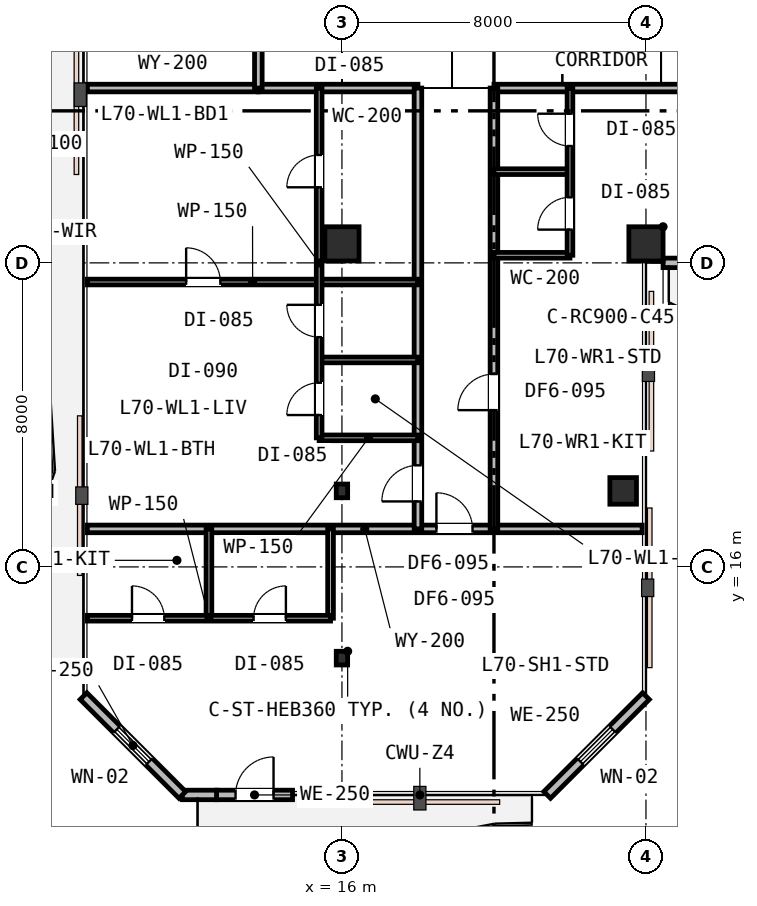
"""IFC4 building model, lengths in metres.
Left out: names, types, materials, properties, quantities, classifications, styles, units other than length and angle.
Written with IfcOpenShell. Run it as: python <this file> out.ifc"""

import sys

from ifc_helpers import new_model, si_unit, direction, frame, frame_2d, origin, origin_2d, place, context, subcontext, project, spatial, rectangle, i_section, extrude, element, fill, save


model = new_model("IFC4")
c1 = context("Model", 3, precision=1e-05, world=origin(), true_north=direction((0.0, 1.0)))
c2 = subcontext(c1, "Body", "Model", "MODEL_VIEW")
j1 = project(units=[si_unit("LENGTHUNIT", "METRE"), si_unit("PLANEANGLEUNIT", "RADIAN")], contexts=[c1])
p1 = place(None, origin())
s1 = spatial("IfcSite", under=j1, at=p1, CompositionType="ELEMENT")
p2 = place(p1, origin())
s2 = spatial("IfcBuilding", under=s1, at=p2, CompositionType="ELEMENT")
p3 = place(p2, frame((0.0, 0.0, 271.6)))
s3 = spatial("IfcBuildingStorey", under=s2, at=p3, CompositionType="ELEMENT", Elevation=271.6)
for number, where, z_axis, x_axis in (
    (1, (16.0, 24.5, 0.0), (0.0, 0.0, 1.0), (1.0, 0.0, 0.0)),
    (2, (24.0, 24.5, 0.0), (0.0, 0.0, 1.0), (1.0, 0.0, 0.0)),
):
    element("IfcColumn", number, at=place(p3, frame(where, z_axis=z_axis, x_axis=x_axis)), inside=s3, PredefinedType="COLUMN", context=c2, shape_type="SweptSolid", body=[
        extrude(rectangle(XDim=0.9, YDim=0.9, at=origin_2d()), origin(), (0.0, 0.0, 1.0), 3.8),
    ])
p4 = place(p3, frame((23.4, 18.0, 0.0), z_axis=(0.0, 0.0, 1.0), x_axis=(1.0, 0.0, 0.0)))
e3 = element("IfcColumn", 3, at=p4, inside=s3, PredefinedType="COLUMN", context=c2, shape_type="SweptSolid", body=[
    extrude(rectangle(XDim=0.7, YDim=0.7, at=origin_2d()), origin(), (0.0, 0.0, 1.0), 3.8),
])
for number, where, z_axis, x_axis in (
    (4, (16.0, 13.6, 0.0), (0.0, 0.0, 1.0), (1.0, 0.0, 0.0)),
    (5, (16.0, 18.0, 0.0), (0.0, 0.0, 1.0), (1.0, 0.0, 0.0)),
):
    element("IfcColumn", number, at=place(p3, frame(where, z_axis=z_axis, x_axis=x_axis)), inside=s3, PredefinedType="COLUMN", context=c2, shape_type="SweptSolid", body=[
        extrude(i_section(OverallWidth=0.3, OverallDepth=0.36, WebThickness=0.013, FlangeThickness=0.022, FilletRadius=0.027, at=origin_2d()), origin(), (0.0, 0.0, 1.0), 3.8),
    ])
p5 = place(p3, frame((12.7, 10.0, 0.0), z_axis=(0.0, 0.0, 1.0), x_axis=(1.0, 0.0, 0.0)))
e6 = element("IfcWall", 6, at=p5, inside=s3, PredefinedType="STANDARD", context=c2, shape_type="SweptSolid", body=[
    extrude(rectangle(XDim=2.0, YDim=0.25, at=frame_2d((1.0, 0.0))), origin(), (0.0, 0.0, 1.0), 3.53),
])
p6 = place(p5, frame((0.5, 0.0, 0.0)))
e7 = element("IfcOpeningElement", 7, at=p6, cuts=e6, PredefinedType="OPENING", context=c2, shape_type="SweptSolid", body=[
    extrude(rectangle(XDim=1.0, YDim=2.15, at=frame_2d((0.5, 1.075))), frame((0.0, 0.135, 0.0), z_axis=(0.0, -1.0, 0.0), x_axis=(1.0, 0.0, 0.0)), (0.0, 0.0, 1.0), 0.27),
])
p7 = place(p3, frame((11.8, 10.0, 0.0), z_axis=(0.0, 0.0, 1.0), x_axis=(1.0, 0.0, 0.0)))
e8 = element("IfcWall", 8, at=p7, inside=s3, PredefinedType="STANDARD", context=c2, shape_type="SweptSolid", body=[
    extrude(rectangle(XDim=0.9, YDim=0.25, at=frame_2d((0.45, 0.0))), origin(), (0.0, 0.0, 1.0), 3.53),
])
p8 = place(p3, frame((21.4, 10.0, 0.0), z_axis=(0.0, 0.0, 1.0), x_axis=(0.707106781187, 0.707106781187, 0.0)))
e9 = element("IfcWall", 9, at=p8, inside=s3, PredefinedType="STANDARD", context=c2, shape_type="SweptSolid", body=[
    extrude(rectangle(XDim=3.677, YDim=0.25, at=frame_2d((1.839, 0.0))), origin(), (0.0, 0.0, 1.0), 3.53),
])
p9 = place(p8, frame((1.238, 0.0, 0.85)))
e10 = element("IfcOpeningElement", 10, at=p9, cuts=e9, PredefinedType="OPENING", context=c2, shape_type="SweptSolid", body=[
    extrude(rectangle(XDim=1.2, YDim=1.6, at=frame_2d((0.6, 0.8))), frame((0.0, 0.135, 0.0), z_axis=(0.0, -1.0, 0.0), x_axis=(1.0, 0.0, 0.0)), (0.0, 0.0, 1.0), 0.27),
])
p10 = place(p3, frame((24.45, 24.0, 0.0), z_axis=(0.0, 0.0, 1.0), x_axis=(1.0, 0.0, 0.0)))
e11 = element("IfcWall", 11, at=p10, inside=s3, PredefinedType="STANDARD", context=c2, shape_type="SweptSolid", body=[
    extrude(rectangle(XDim=0.95, YDim=0.25, at=frame_2d((0.475, 0.0))), origin(), (0.0, 0.0, 1.0), 3.27),
])
p11 = place(p3, frame((9.2, 12.6, 0.0), z_axis=(0.0, 0.0, 1.0), x_axis=(0.707106781187, -0.707106781187, 0.0)))
e12 = element("IfcWall", 12, at=p11, inside=s3, PredefinedType="STANDARD", context=c2, shape_type="SweptSolid", body=[
    extrude(rectangle(XDim=3.677, YDim=0.25, at=frame_2d((1.839, 0.0))), origin(), (0.0, 0.0, 1.0), 3.53),
])
p12 = place(p11, frame((1.238, 0.0, 0.85)))
e13 = element("IfcOpeningElement", 13, at=p12, cuts=e12, PredefinedType="OPENING", context=c2, shape_type="SweptSolid", body=[
    extrude(rectangle(XDim=1.2, YDim=1.6, at=frame_2d((0.6, 0.8))), frame((0.0, 0.135, 0.0), z_axis=(0.0, -1.0, 0.0), x_axis=(1.0, 0.0, 0.0)), (0.0, 0.0, 1.0), 0.27),
])
p13 = place(p3, frame((9.3, 28.6, 0.0), z_axis=(0.0, 0.0, 1.0), x_axis=(1.0, 0.0, 0.0)))
e14 = element("IfcWall", 14, at=p13, inside=s3, PredefinedType="PARTITIONING", context=c2, shape_type="SweptSolid", body=[
    extrude(rectangle(XDim=4.5, YDim=0.2, at=frame_2d((2.25, 0.0))), origin(), (0.0, 0.0, 1.0), 3.53),
])
p14 = place(p3, frame((13.8, 28.6, 0.0), z_axis=(0.0, 0.0, 1.0), x_axis=(1.0, 0.0, 0.0)))
e15 = element("IfcWall", 15, at=p14, inside=s3, PredefinedType="PARTITIONING", context=c2, shape_type="SweptSolid", body=[
    extrude(rectangle(XDim=4.2, YDim=0.2, at=frame_2d((2.1, 0.0))), origin(), (0.0, 0.0, 1.0), 3.16),
])
p15 = place(p3, frame((20.0, 28.6, 0.0), z_axis=(0.0, 0.0, 1.0), x_axis=(1.0, 0.0, 0.0)))
e16 = element("IfcWall", 16, at=p15, inside=s3, PredefinedType="PARTITIONING", context=c2, shape_type="SweptSolid", body=[
    extrude(rectangle(XDim=25.9, YDim=0.2, at=frame_2d((12.95, 0.0))), origin(), (0.0, 0.0, 1.0), 3.16),
])
p16 = place(p15, frame((7.025, 0.0, 0.0)))
e17 = element("IfcOpeningElement", 17, at=p16, cuts=e16, PredefinedType="OPENING", context=c2, shape_type="SweptSolid", body=[
    extrude(rectangle(XDim=0.95, YDim=2.15, at=frame_2d((0.475, 1.075))), frame((0.0, 0.11, 0.0), z_axis=(0.0, -1.0, 0.0), x_axis=(1.0, 0.0, 0.0)), (0.0, 0.0, 1.0), 0.22),
])
p17 = place(p15, frame((13.625, 0.0, 0.0)))
e18 = element("IfcOpeningElement", 18, at=p17, cuts=e16, PredefinedType="OPENING", context=c2, shape_type="SweptSolid", body=[
    extrude(rectangle(XDim=0.95, YDim=2.15, at=frame_2d((0.475, 1.075))), frame((0.0, 0.11, 0.0), z_axis=(0.0, -1.0, 0.0), x_axis=(1.0, 0.0, 0.0)), (0.0, 0.0, 1.0), 0.22),
])
p18 = place(p15, frame((18.378, 0.0, 0.0)))
e19 = element("IfcOpeningElement", 19, at=p18, cuts=e16, PredefinedType="OPENING", context=c2, shape_type="SweptSolid", body=[
    extrude(rectangle(XDim=0.95, YDim=2.15, at=frame_2d((0.475, 1.075))), frame((0.0, 0.11, 0.0), z_axis=(0.0, -1.0, 0.0), x_axis=(1.0, 0.0, 0.0)), (0.0, 0.0, 1.0), 0.22),
])
p19 = place(p3, frame((13.8, 28.6, 0.0), z_axis=(0.0, 0.0, 1.0), x_axis=(0.0, 1.0, 0.0)))
e20 = element("IfcWall", 20, at=p19, inside=s3, PredefinedType="PARTITIONING", context=c2, shape_type="SweptSolid", body=[
    extrude(rectangle(XDim=7.4, YDim=0.2, at=frame_2d((3.7, 0.0))), origin(), (0.0, 0.0, 1.0), 3.53),
])
p20 = place(p19, frame((4.325, 0.0, 0.0)))
e21 = element("IfcOpeningElement", 21, at=p20, cuts=e20, PredefinedType="OPENING", context=c2, shape_type="SweptSolid", body=[
    extrude(rectangle(XDim=0.95, YDim=2.15, at=frame_2d((0.475, 1.075))), frame((0.0, 0.11, 0.0), z_axis=(0.0, -1.0, 0.0), x_axis=(1.0, 0.0, 0.0)), (0.0, 0.0, 1.0), 0.22),
])
p21 = place(p3, frame((9.3, 17.0, 0.0), z_axis=(0.0, 0.0, 1.0), x_axis=(1.0, 0.0, 0.0)))
e22 = element("IfcWall", 22, at=p21, inside=s3, PredefinedType="PARTITIONING", context=c2, shape_type="SweptSolid", body=[
    extrude(rectangle(XDim=14.6, YDim=0.2, at=frame_2d((7.3, 0.0))), origin(), (0.0, 0.0, 1.0), 3.16),
])
p22 = place(p21, frame((9.186, 0.0, 0.0)))
e23 = element("IfcOpeningElement", 23, at=p22, cuts=e22, PredefinedType="OPENING", context=c2, shape_type="SweptSolid", body=[
    extrude(rectangle(XDim=0.95, YDim=2.15, at=frame_2d((0.475, 1.075))), frame((0.0, 0.11, 0.0), z_axis=(0.0, -1.0, 0.0), x_axis=(1.0, 0.0, 0.0)), (0.0, 0.0, 1.0), 0.22),
])
p23 = place(p3, frame((18.0, 17.0, 0.0), z_axis=(0.0, 0.0, 1.0), x_axis=(0.0, 1.0, 0.0)))
e24 = element("IfcWall", 24, at=p23, inside=s3, PredefinedType="PARTITIONING", context=c2, shape_type="SweptSolid", body=[
    extrude(rectangle(XDim=11.6, YDim=0.2, at=frame_2d((5.8, 0.0))), origin(), (0.0, 0.0, 1.0), 3.16),
])
p24 = place(p23, frame((0.723, 0.0, 0.0)))
e25 = element("IfcOpeningElement", 25, at=p24, cuts=e24, PredefinedType="OPENING", context=c2, shape_type="SweptSolid", body=[
    extrude(rectangle(XDim=0.95, YDim=2.15, at=frame_2d((0.475, 1.075))), frame((0.0, 0.11, 0.0), z_axis=(0.0, -1.0, 0.0), x_axis=(1.0, 0.0, 0.0)), (0.0, 0.0, 1.0), 0.22),
])
for number, where, z_axis, x_axis in (
    (26, (15.4, 19.396, 0.0), (0.0, 0.0, 1.0), (1.0, 0.0, 0.0)),
    (27, (15.4, 21.446, 0.0), (0.0, 0.0, 1.0), (1.0, 0.0, 0.0)),
):
    element("IfcWall", number, at=place(p3, frame(where, z_axis=z_axis, x_axis=x_axis)), inside=s3, PredefinedType="PARTITIONING", context=c2, shape_type="SweptSolid", body=[
        extrude(rectangle(XDim=2.6, YDim=0.15, at=frame_2d((1.3, 0.0))), origin(), (0.0, 0.0, 1.0), 3.16),
    ])
p25 = place(p3, frame((9.3, 23.496, 0.0), z_axis=(0.0, 0.0, 1.0), x_axis=(1.0, 0.0, 0.0)))
e28 = element("IfcWall", 28, at=p25, inside=s3, PredefinedType="PARTITIONING", context=c2, shape_type="SweptSolid", body=[
    extrude(rectangle(XDim=8.7, YDim=0.15, at=frame_2d((4.35, 0.0))), origin(), (0.0, 0.0, 1.0), 3.16),
])
p26 = place(p25, frame((2.6, 0.0, 0.0)))
e29 = element("IfcOpeningElement", 29, at=p26, cuts=e28, PredefinedType="OPENING", context=c2, shape_type="SweptSolid", body=[
    extrude(rectangle(XDim=0.9, YDim=2.15, at=frame_2d((0.45, 1.075))), frame((0.0, 0.085, 0.0), z_axis=(0.0, -1.0, 0.0), x_axis=(1.0, 0.0, 0.0)), (0.0, 0.0, 1.0), 0.17),
])
p27 = place(p3, frame((15.4, 19.396, 0.0), z_axis=(0.0, 0.0, 1.0), x_axis=(0.0, 1.0, 0.0)))
e30 = element("IfcWall", 30, at=p27, inside=s3, PredefinedType="PARTITIONING", context=c2, shape_type="SweptSolid", body=[
    extrude(rectangle(XDim=9.204, YDim=0.15, at=frame_2d((4.602, 0.0))), origin(), (0.0, 0.0, 1.0), 3.53),
])
p28 = place(p27, frame((0.6, 0.0, 0.0)))
e31 = element("IfcOpeningElement", 31, at=p28, cuts=e30, PredefinedType="OPENING", context=c2, shape_type="SweptSolid", body=[
    extrude(rectangle(XDim=0.85, YDim=2.15, at=frame_2d((0.425, 1.075))), frame((0.0, 0.085, 0.0), z_axis=(0.0, -1.0, 0.0), x_axis=(1.0, 0.0, 0.0)), (0.0, 0.0, 1.0), 0.17),
])
p29 = place(p27, frame((2.65, 0.0, 0.0)))
e32 = element("IfcOpeningElement", 32, at=p29, cuts=e30, PredefinedType="OPENING", context=c2, shape_type="SweptSolid", body=[
    extrude(rectangle(XDim=0.85, YDim=2.15, at=frame_2d((0.425, 1.075))), frame((0.0, 0.085, 0.0), z_axis=(0.0, -1.0, 0.0), x_axis=(1.0, 0.0, 0.0)), (0.0, 0.0, 1.0), 0.17),
])
p30 = place(p27, frame((6.593, 0.0, 0.0)))
e33 = element("IfcOpeningElement", 33, at=p30, cuts=e30, PredefinedType="OPENING", context=c2, shape_type="SweptSolid", body=[
    extrude(rectangle(XDim=0.85, YDim=2.15, at=frame_2d((0.425, 1.075))), frame((0.0, 0.085, 0.0), z_axis=(0.0, -1.0, 0.0), x_axis=(1.0, 0.0, 0.0)), (0.0, 0.0, 1.0), 0.17),
])
p31 = place(p3, frame((20.0, 17.0, 0.0), z_axis=(0.0, 0.0, 1.0), x_axis=(0.0, 1.0, 0.0)))
e34 = element("IfcWall", 34, at=p31, inside=s3, PredefinedType="PARTITIONING", context=c2, shape_type="SweptSolid", body=[
    extrude(rectangle(XDim=11.6, YDim=0.2, at=frame_2d((5.8, 0.0))), origin(), (0.0, 0.0, 1.0), 3.16),
])
p32 = place(p31, frame((3.125, 0.0, 0.0)))
e35 = element("IfcOpeningElement", 35, at=p32, cuts=e34, PredefinedType="OPENING", context=c2, shape_type="SweptSolid", body=[
    extrude(rectangle(XDim=0.95, YDim=2.15, at=frame_2d((0.475, 1.075))), frame((0.0, 0.11, 0.0), z_axis=(0.0, -1.0, 0.0), x_axis=(1.0, 0.0, 0.0)), (0.0, 0.0, 1.0), 0.22),
])
p33 = place(p3, frame((20.0, 24.2, 0.0), z_axis=(0.0, 0.0, 1.0), x_axis=(1.0, 0.0, 0.0)))
e36 = element("IfcWall", 36, at=p33, inside=s3, PredefinedType="PARTITIONING", context=c2, shape_type="SweptSolid", body=[
    extrude(rectangle(XDim=2.0, YDim=0.15, at=frame_2d((1.0, 0.0))), origin(), (0.0, 0.0, 1.0), 3.16),
])
p34 = place(p3, frame((20.0, 26.4, 0.0), z_axis=(0.0, 0.0, 1.0), x_axis=(1.0, 0.0, 0.0)))
e37 = element("IfcWall", 37, at=p34, inside=s3, PredefinedType="PARTITIONING", context=c2, shape_type="SweptSolid", body=[
    extrude(rectangle(XDim=2.0, YDim=0.15, at=frame_2d((1.0, 0.0))), origin(), (0.0, 0.0, 1.0), 3.28),
])
p35 = place(p3, frame((22.0, 24.2, 0.0), z_axis=(0.0, 0.0, 1.0), x_axis=(0.0, 1.0, 0.0)))
e38 = element("IfcWall", 38, at=p35, inside=s3, PredefinedType="PARTITIONING", context=c2, shape_type="SweptSolid", body=[
    extrude(rectangle(XDim=4.4, YDim=0.15, at=frame_2d((2.2, 0.0))), origin(), (0.0, 0.0, 1.0), 3.16),
])
p36 = place(p35, frame((0.675, 0.0, 0.0)))
e39 = element("IfcOpeningElement", 39, at=p36, cuts=e38, PredefinedType="OPENING", context=c2, shape_type="SweptSolid", body=[
    extrude(rectangle(XDim=0.85, YDim=2.15, at=frame_2d((0.425, 1.075))), frame((0.0, 0.085, 0.0), z_axis=(0.0, -1.0, 0.0), x_axis=(1.0, 0.0, 0.0)), (0.0, 0.0, 1.0), 0.17),
])
p37 = place(p35, frame((2.875, 0.0, 0.0)))
e40 = element("IfcOpeningElement", 40, at=p37, cuts=e38, PredefinedType="OPENING", context=c2, shape_type="SweptSolid", body=[
    extrude(rectangle(XDim=0.85, YDim=2.15, at=frame_2d((0.425, 1.075))), frame((0.0, 0.085, 0.0), z_axis=(0.0, -1.0, 0.0), x_axis=(1.0, 0.0, 0.0)), (0.0, 0.0, 1.0), 0.17),
])
p38 = place(p3, frame((15.7, 14.65, 0.0), z_axis=(0.0, 0.0, 1.0), x_axis=(0.0, 1.0, 0.0)))
e41 = element("IfcWall", 41, at=p38, inside=s3, PredefinedType="PARTITIONING", context=c2, shape_type="SweptSolid", body=[
    extrude(rectangle(XDim=2.35, YDim=0.15, at=frame_2d((1.175, 0.0))), origin(), (0.0, 0.0, 1.0), 3.16),
])
p39 = place(p3, frame((12.5, 14.65, 0.0), z_axis=(0.0, 0.0, 1.0), x_axis=(0.0, 1.0, 0.0)))
e42 = element("IfcWall", 42, at=p39, inside=s3, PredefinedType="PARTITIONING", context=c2, shape_type="SweptSolid", body=[
    extrude(rectangle(XDim=2.35, YDim=0.15, at=frame_2d((1.175, 0.0))), origin(), (0.0, 0.0, 1.0), 3.53),
])
p40 = place(p3, frame((9.3, 14.65, 0.0), z_axis=(0.0, 0.0, 1.0), x_axis=(1.0, 0.0, 0.0)))
e43 = element("IfcWall", 43, at=p40, inside=s3, PredefinedType="PARTITIONING", context=c2, shape_type="SweptSolid", body=[
    extrude(rectangle(XDim=6.4, YDim=0.15, at=frame_2d((3.2, 0.0))), origin(), (0.0, 0.0, 1.0), 3.16),
])
p41 = place(p40, frame((1.175, 0.0, 0.0)))
e44 = element("IfcOpeningElement", 44, at=p41, cuts=e43, PredefinedType="OPENING", context=c2, shape_type="SweptSolid", body=[
    extrude(rectangle(XDim=0.85, YDim=2.15, at=frame_2d((0.425, 1.075))), frame((0.0, 0.085, 0.0), z_axis=(0.0, -1.0, 0.0), x_axis=(1.0, 0.0, 0.0)), (0.0, 0.0, 1.0), 0.17),
])
p42 = place(p40, frame((4.375, 0.0, 0.0)))
e45 = element("IfcOpeningElement", 45, at=p42, cuts=e43, PredefinedType="OPENING", context=c2, shape_type="SweptSolid", body=[
    extrude(rectangle(XDim=0.85, YDim=2.15, at=frame_2d((0.425, 1.075))), frame((0.0, 0.085, 0.0), z_axis=(0.0, -1.0, 0.0), x_axis=(1.0, 0.0, 0.0)), (0.0, 0.0, 1.0), 0.17),
])
p43 = place(p6, origin())
e46 = element("IfcDoor", 46, at=p43, inside=s3, OperationType="SINGLE_SWING_RIGHT", PredefinedType="DOOR", context=c2, shape_type="SweptSolid", body=[
    extrude(rectangle(XDim=1.0, YDim=2.15, at=frame_2d((0.5, 1.075))), frame((0.0, 0.025, 0.0), z_axis=(0.0, -1.0, 0.0), x_axis=(1.0, 0.0, 0.0)), (0.0, 0.0, 1.0), 0.05),
])
fill(e7, e46)
p44 = place(p9, origin())
e47 = element("IfcWindow", 47, at=p44, inside=s3, PartitioningType="SINGLE_PANEL", PredefinedType="WINDOW", context=c2, shape_type="SweptSolid", body=[
    extrude(rectangle(XDim=1.2, YDim=1.6, at=frame_2d((0.6, 0.8))), frame((0.0, 0.03, 0.0), z_axis=(0.0, -1.0, 0.0), x_axis=(1.0, 0.0, 0.0)), (0.0, 0.0, 1.0), 0.06),
])
fill(e10, e47)
p45 = place(p12, origin())
e48 = element("IfcWindow", 48, at=p45, inside=s3, PartitioningType="SINGLE_PANEL", PredefinedType="WINDOW", context=c2, shape_type="SweptSolid", body=[
    extrude(rectangle(XDim=1.2, YDim=1.6, at=frame_2d((0.6, 0.8))), frame((0.0, 0.03, 0.0), z_axis=(0.0, -1.0, 0.0), x_axis=(1.0, 0.0, 0.0)), (0.0, 0.0, 1.0), 0.06),
])
fill(e13, e48)
p46 = place(p24, origin())
e49 = element("IfcDoor", 49, at=p46, inside=s3, OperationType="SINGLE_SWING_LEFT", PredefinedType="DOOR", context=c2, shape_type="SweptSolid", body=[
    extrude(rectangle(XDim=0.95, YDim=2.15, at=frame_2d((0.475, 1.075))), frame((0.0, 0.025, 0.0), z_axis=(0.0, -1.0, 0.0), x_axis=(1.0, 0.0, 0.0)), (0.0, 0.0, 1.0), 0.05),
])
fill(e25, e49)
p47 = place(p28, origin())
e50 = element("IfcDoor", 50, at=p47, inside=s3, OperationType="SINGLE_SWING_LEFT", PredefinedType="DOOR", context=c2, shape_type="SweptSolid", body=[
    extrude(rectangle(XDim=0.85, YDim=2.15, at=frame_2d((0.425, 1.075))), frame((0.0, 0.025, 0.0), z_axis=(0.0, -1.0, 0.0), x_axis=(1.0, 0.0, 0.0)), (0.0, 0.0, 1.0), 0.05),
])
fill(e31, e50)
p48 = place(p29, origin())
e51 = element("IfcDoor", 51, at=p48, inside=s3, OperationType="SINGLE_SWING_RIGHT", PredefinedType="DOOR", context=c2, shape_type="SweptSolid", body=[
    extrude(rectangle(XDim=0.85, YDim=2.15, at=frame_2d((0.425, 1.075))), frame((0.0, 0.025, 0.0), z_axis=(0.0, -1.0, 0.0), x_axis=(1.0, 0.0, 0.0)), (0.0, 0.0, 1.0), 0.05),
])
fill(e32, e51)
p49 = place(p30, origin())
e52 = element("IfcDoor", 52, at=p49, inside=s3, OperationType="SINGLE_SWING_LEFT", PredefinedType="DOOR", context=c2, shape_type="SweptSolid", body=[
    extrude(rectangle(XDim=0.85, YDim=2.15, at=frame_2d((0.425, 1.075))), frame((0.0, 0.025, 0.0), z_axis=(0.0, -1.0, 0.0), x_axis=(1.0, 0.0, 0.0)), (0.0, 0.0, 1.0), 0.05),
])
fill(e33, e52)
p50 = place(p26, origin())
e53 = element("IfcDoor", 53, at=p50, inside=s3, OperationType="SINGLE_SWING_LEFT", PredefinedType="DOOR", context=c2, shape_type="SweptSolid", body=[
    extrude(rectangle(XDim=0.9, YDim=2.15, at=frame_2d((0.45, 1.075))), frame((0.0, 0.025, 0.0), z_axis=(0.0, -1.0, 0.0), x_axis=(1.0, 0.0, 0.0)), (0.0, 0.0, 1.0), 0.05),
])
fill(e29, e53)
p51 = place(p32, origin())
e54 = element("IfcDoor", 54, at=p51, inside=s3, OperationType="SINGLE_SWING_LEFT", PredefinedType="DOOR", context=c2, shape_type="SweptSolid", body=[
    extrude(rectangle(XDim=0.95, YDim=2.15, at=frame_2d((0.475, 1.075))), frame((0.0, 0.025, 0.0), z_axis=(0.0, -1.0, 0.0), x_axis=(1.0, 0.0, 0.0)), (0.0, 0.0, 1.0), 0.05),
])
fill(e35, e54)
p52 = place(p36, origin())
e55 = element("IfcDoor", 55, at=p52, inside=s3, OperationType="SINGLE_SWING_LEFT", PredefinedType="DOOR", context=c2, shape_type="SweptSolid", body=[
    extrude(rectangle(XDim=0.85, YDim=2.15, at=frame_2d((0.425, 1.075))), frame((0.0, 0.025, 0.0), z_axis=(0.0, -1.0, 0.0), x_axis=(1.0, 0.0, 0.0)), (0.0, 0.0, 1.0), 0.05),
])
fill(e39, e55)
p53 = place(p37, origin())
e56 = element("IfcDoor", 56, at=p53, inside=s3, OperationType="SINGLE_SWING_RIGHT", PredefinedType="DOOR", context=c2, shape_type="SweptSolid", body=[
    extrude(rectangle(XDim=0.85, YDim=2.15, at=frame_2d((0.425, 1.075))), frame((0.0, 0.025, 0.0), z_axis=(0.0, -1.0, 0.0), x_axis=(1.0, 0.0, 0.0)), (0.0, 0.0, 1.0), 0.05),
])
fill(e40, e56)
p54 = place(p22, origin())
e57 = element("IfcDoor", 57, at=p54, inside=s3, OperationType="SINGLE_SWING_LEFT", PredefinedType="DOOR", context=c2, shape_type="SweptSolid", body=[
    extrude(rectangle(XDim=0.95, YDim=2.15, at=frame_2d((0.475, 1.075))), frame((0.0, 0.025, 0.0), z_axis=(0.0, -1.0, 0.0), x_axis=(1.0, 0.0, 0.0)), (0.0, 0.0, 1.0), 0.05),
])
fill(e23, e57)
p55 = place(p41, origin())
e58 = element("IfcDoor", 58, at=p55, inside=s3, OperationType="SINGLE_SWING_LEFT", PredefinedType="DOOR", context=c2, shape_type="SweptSolid", body=[
    extrude(rectangle(XDim=0.85, YDim=2.15, at=frame_2d((0.425, 1.075))), frame((0.0, 0.025, 0.0), z_axis=(0.0, -1.0, 0.0), x_axis=(1.0, 0.0, 0.0)), (0.0, 0.0, 1.0), 0.05),
])
fill(e44, e58)
p56 = place(p42, origin())
e59 = element("IfcDoor", 59, at=p56, inside=s3, OperationType="SINGLE_SWING_RIGHT", PredefinedType="DOOR", context=c2, shape_type="SweptSolid", body=[
    extrude(rectangle(XDim=0.85, YDim=2.15, at=frame_2d((0.425, 1.075))), frame((0.0, 0.025, 0.0), z_axis=(0.0, -1.0, 0.0), x_axis=(1.0, 0.0, 0.0)), (0.0, 0.0, 1.0), 0.05),
])
fill(e45, e59)
save(model, sys.argv[1])
